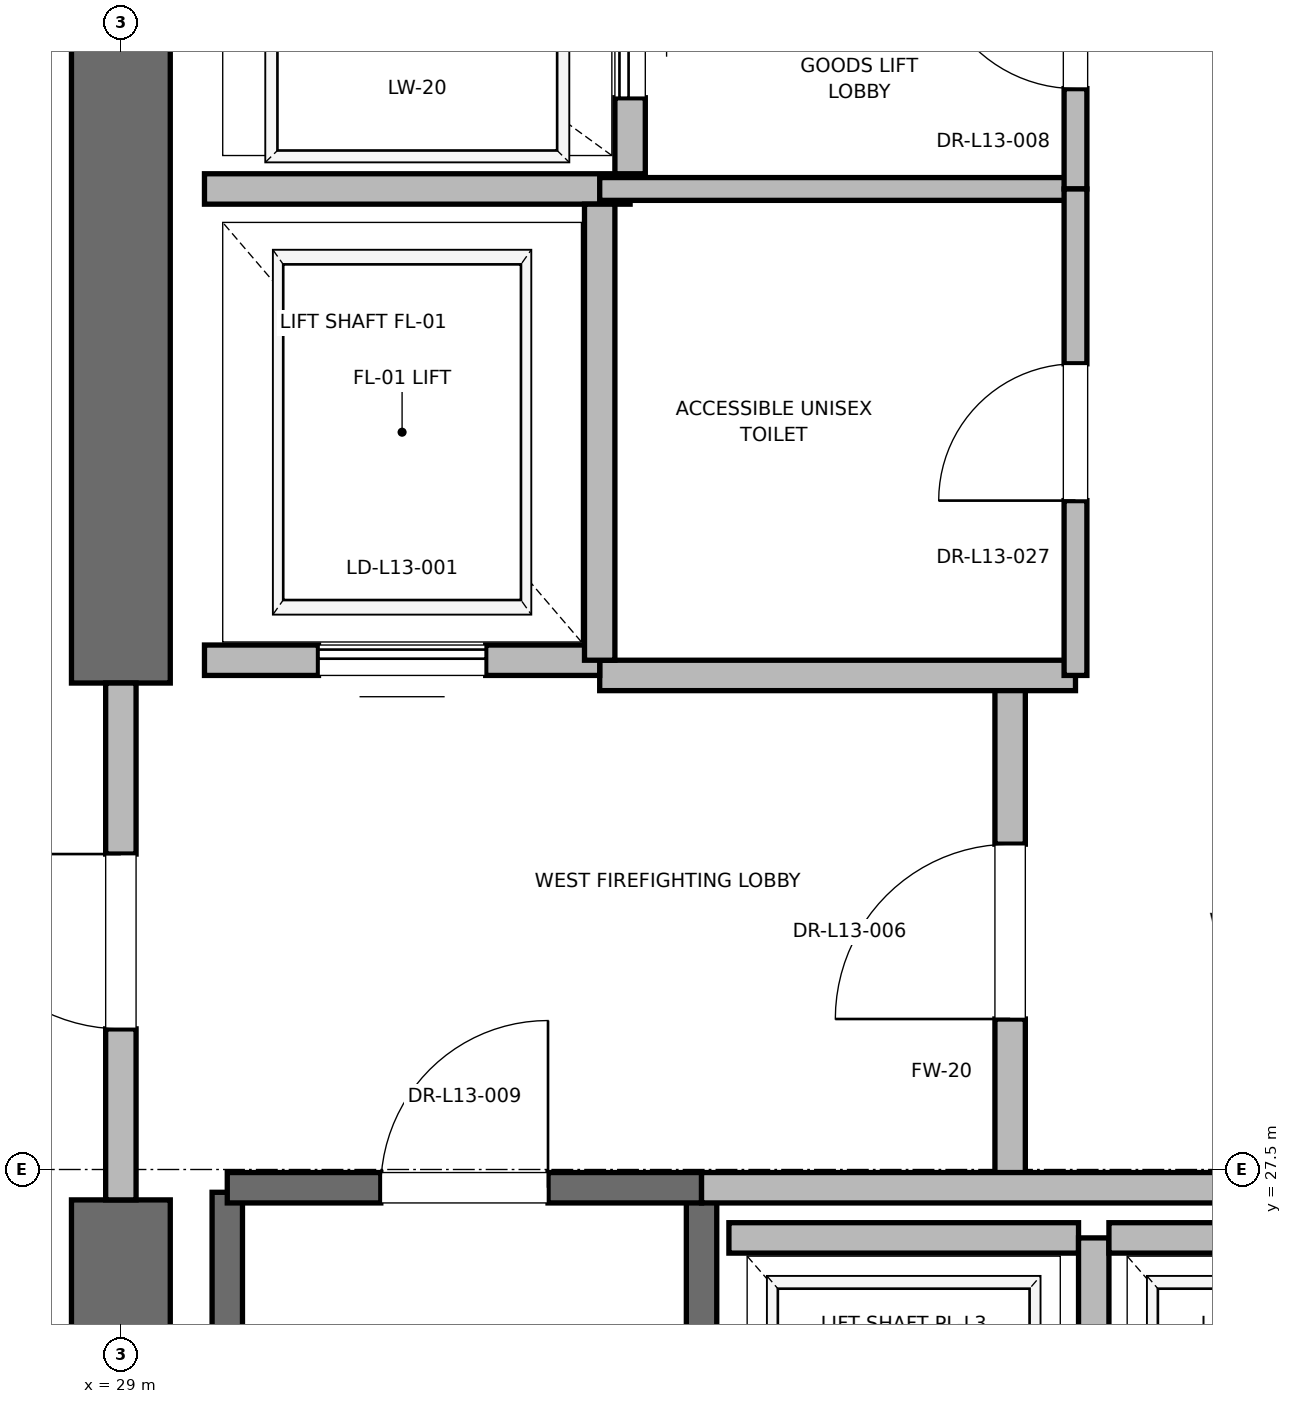
"""IFC4 building model, lengths in metres.
Left out: names, types, materials, properties, quantities, classifications, styles, units other than length and angle.
Written with IfcOpenShell. Run it as: python <this file> out.ifc"""

import sys

from ifc_helpers import new_model, si_unit, direction, frame, frame_2d, origin, place, context, subcontext, project, spatial, rectangle, extrude, element, fill, save


model = new_model("IFC4")
c1 = context("Model", 3, precision=1e-05, world=origin(), true_north=direction((0.0, 1.0)))
c2 = subcontext(c1, "Body", "Model", "MODEL_VIEW")
j1 = project(units=[si_unit("LENGTHUNIT", "METRE"), si_unit("PLANEANGLEUNIT", "RADIAN")], contexts=[c1])
p1 = place(None, origin())
s1 = spatial("IfcSite", under=j1, at=p1, CompositionType="ELEMENT")
p2 = place(p1, origin())
s2 = spatial("IfcBuilding", under=s1, at=p2, CompositionType="ELEMENT")
p3 = place(p2, frame((0.0, 0.0, 59.6)))
s3 = spatial("IfcBuildingStorey", under=s2, at=p3, CompositionType="ELEMENT", Elevation=59.6)
p4 = place(p3, frame((29.0, 18.5, 0.0), z_axis=(0.0, 0.0, 1.0), x_axis=(0.0, 1.0, 0.0)))
e1 = element("IfcWall", 1, at=p4, inside=s3, PredefinedType="SHEAR", context=c2, shape_type="SweptSolid", body=[
    extrude(rectangle(XDim=8.8, YDim=0.65, at=frame_2d((4.4, 0.0))), origin(), (0.0, 0.0, 1.0), 3.76),
])
p5 = place(p3, frame((29.0, 30.7, 0.0), z_axis=(0.0, 0.0, 1.0), x_axis=(0.0, 1.0, 0.0)))
e2 = element("IfcWall", 2, at=p5, inside=s3, PredefinedType="SHEAR", context=c2, shape_type="SweptSolid", body=[
    extrude(rectangle(XDim=5.8, YDim=0.65, at=frame_2d((2.9, 0.0))), origin(), (0.0, 0.0, 1.0), 3.76),
])
p6 = place(p3, frame((29.7, 19.2, 0.0), z_axis=(0.0, 0.0, 1.0), x_axis=(0.0, 1.0, 0.0)))
e3 = element("IfcWall", 3, at=p6, inside=s3, PredefinedType="SOLIDWALL", context=c2, shape_type="SweptSolid", body=[
    extrude(rectangle(XDim=8.15, YDim=0.2, at=frame_2d((4.075, 0.0))), origin(), (0.0, 0.0, 1.0), 3.76),
])
p7 = place(p3, frame((32.82, 18.6, 0.0), z_axis=(0.0, 0.0, 1.0), x_axis=(0.0, 1.0, 0.0)))
e4 = element("IfcWall", 4, at=p7, inside=s3, PredefinedType="SOLIDWALL", context=c2, shape_type="SweptSolid", body=[
    extrude(rectangle(XDim=8.78, YDim=0.2, at=frame_2d((4.39, 0.0))), origin(), (0.0, 0.0, 1.0), 3.76),
])
p8 = place(p3, frame((29.7, 27.38, 0.0), z_axis=(0.0, 0.0, 1.0), x_axis=(1.0, 0.0, 0.0)))
e5 = element("IfcWall", 5, at=p8, inside=s3, PredefinedType="SOLIDWALL", context=c2, shape_type="SweptSolid", body=[
    extrude(rectangle(XDim=3.12, YDim=0.2, at=frame_2d((1.56, 0.0))), origin(), (0.0, 0.0, 1.0), 3.76),
])
p9 = place(p8, frame((1.01, 0.0, 0.0)))
e6 = element("IfcOpeningElement", 6, at=p9, cuts=e5, PredefinedType="OPENING", context=c2, shape_type="SweptSolid", body=[
    extrude(rectangle(XDim=1.1, YDim=2.15, at=frame_2d((0.55, 1.075))), frame((0.0, 0.1, 0.0), z_axis=(0.0, -1.0, 0.0), x_axis=(1.0, 0.0, 0.0)), (0.0, 0.0, 1.0), 0.2),
])
p10 = place(p3, frame((34.85, 27.38, 0.0), z_axis=(0.0, 0.0, 1.0), x_axis=(0.0, 1.0, 0.0)))
e7 = element("IfcWall", 7, at=p10, inside=s3, PredefinedType="PARTITIONING", context=c2, shape_type="SweptSolid", body=[
    extrude(rectangle(XDim=3.37, YDim=0.2, at=frame_2d((1.685, 0.0))), origin(), (0.0, 0.0, 1.0), 3.76),
])
p11 = place(p10, frame((1.11, 0.0, 0.0)))
e8 = element("IfcOpeningElement", 8, at=p11, cuts=e7, PredefinedType="OPENING", context=c2, shape_type="SweptSolid", body=[
    extrude(rectangle(XDim=1.15, YDim=2.2, at=frame_2d((0.575, 1.1))), frame((0.0, 0.1, 0.0), z_axis=(0.0, -1.0, 0.0), x_axis=(1.0, 0.0, 0.0)), (0.0, 0.0, 1.0), 0.2),
])
p12 = place(p3, frame((29.0, 27.3, 0.0), z_axis=(0.0, 0.0, 1.0), x_axis=(0.0, 1.0, 0.0)))
e9 = element("IfcWall", 9, at=p12, inside=s3, PredefinedType="PARTITIONING", context=c2, shape_type="SweptSolid", body=[
    extrude(rectangle(XDim=3.4, YDim=0.2, at=frame_2d((1.7, 0.0))), origin(), (0.0, 0.0, 1.0), 2.54),
])
p13 = place(p12, frame((1.125, 0.0, 0.0)))
e10 = element("IfcOpeningElement", 10, at=p13, cuts=e9, PredefinedType="OPENING", context=c2, shape_type="SweptSolid", body=[
    extrude(rectangle(XDim=1.15, YDim=2.2, at=frame_2d((0.575, 1.1))), frame((0.0, 0.1, 0.0), z_axis=(0.0, -1.0, 0.0), x_axis=(1.0, 0.0, 0.0)), (0.0, 0.0, 1.0), 0.2),
])
p14 = place(p3, frame((32.82, 27.38, 0.0), z_axis=(0.0, 0.0, 1.0), x_axis=(1.0, 0.0, 0.0)))
e11 = element("IfcWall", 11, at=p14, inside=s3, PredefinedType="PARTITIONING", context=c2, shape_type="SweptSolid", body=[
    extrude(rectangle(XDim=5.62, YDim=0.2, at=frame_2d((2.81, 0.0))), origin(), (0.0, 0.0, 1.0), 3.76),
])
p15 = place(p3, frame((32.15, 30.75, 0.0), z_axis=(0.0, 0.0, 1.0), x_axis=(1.0, 0.0, 0.0)))
e12 = element("IfcWall", 12, at=p15, inside=s3, PredefinedType="PARTITIONING", context=c2, shape_type="SweptSolid", body=[
    extrude(rectangle(XDim=3.13, YDim=0.2, at=frame_2d((1.565, 0.0))), origin(), (0.0, 0.0, 1.0), 3.76),
])
p16 = place(p3, frame((29.55, 30.85, 0.0), z_axis=(0.0, 0.0, 1.0), x_axis=(1.0, 0.0, 0.0)))
e13 = element("IfcWall", 13, at=p16, inside=s3, PredefinedType="SOLIDWALL", context=c2, shape_type="SweptSolid", body=[
    extrude(rectangle(XDim=2.6, YDim=0.2, at=frame_2d((1.3, 0.0))), origin(), (0.0, 0.0, 1.0), 2.54),
])
p17 = place(p16, frame((0.75, 0.0, 0.0)))
e14 = element("IfcOpeningElement", 14, at=p17, cuts=e13, PredefinedType="OPENING", context=c2, shape_type="SweptSolid", body=[
    extrude(rectangle(XDim=1.1, YDim=2.2, at=frame_2d((0.55, 1.1))), frame((0.0, 0.1, 0.0), z_axis=(0.0, -1.0, 0.0), x_axis=(1.0, 0.0, 0.0)), (0.0, 0.0, 1.0), 0.2),
])
p18 = place(p3, frame((29.55, 33.95, 0.0), z_axis=(0.0, 0.0, 1.0), x_axis=(1.0, 0.0, 0.0)))
e15 = element("IfcWall", 15, at=p18, inside=s3, PredefinedType="SOLIDWALL", context=c2, shape_type="SweptSolid", body=[
    extrude(rectangle(XDim=2.8, YDim=0.2, at=frame_2d((1.4, 0.0))), origin(), (0.0, 0.0, 1.0), 3.76),
])
p19 = place(p3, frame((32.15, 30.85, 0.0), z_axis=(0.0, 0.0, 1.0), x_axis=(0.0, 1.0, 0.0)))
e16 = element("IfcWall", 16, at=p19, inside=s3, PredefinedType="SOLIDWALL", context=c2, shape_type="SweptSolid", body=[
    extrude(rectangle(XDim=3.0, YDim=0.2, at=frame_2d((1.5, 0.0))), origin(), (0.0, 0.0, 1.0), 3.76),
])
p20 = place(p3, frame((32.35, 34.05, 0.0), z_axis=(0.0, 0.0, 1.0), x_axis=(0.0, 1.0, 0.0)))
e17 = element("IfcWall", 17, at=p20, inside=s3, PredefinedType="SOLIDWALL", context=c2, shape_type="SweptSolid", body=[
    extrude(rectangle(XDim=2.1, YDim=0.2, at=frame_2d((1.05, 0.0))), origin(), (0.0, 0.0, 1.0), 3.76),
])
p21 = place(p20, frame((0.5, 0.0, 0.0)))
e18 = element("IfcOpeningElement", 18, at=p21, cuts=e17, PredefinedType="OPENING", context=c2, shape_type="SweptSolid", body=[
    extrude(rectangle(XDim=1.1, YDim=2.2, at=frame_2d((0.55, 1.1))), frame((0.0, 0.1, 0.0), z_axis=(0.0, -1.0, 0.0), x_axis=(1.0, 0.0, 0.0)), (0.0, 0.0, 1.0), 0.2),
])
p22 = place(p3, frame((35.3, 27.05, 0.0), z_axis=(0.0, 0.0, 1.0), x_axis=(-1.0, 0.0, 0.0)))
e19 = element("IfcWall", 19, at=p22, inside=s3, PredefinedType="SOLIDWALL", context=c2, shape_type="SweptSolid", body=[
    extrude(rectangle(XDim=2.3, YDim=0.2, at=frame_2d((1.15, 0.0))), origin(), (0.0, 0.0, 1.0), 3.76),
])
p23 = place(p3, frame((35.4, 24.45, 0.0), z_axis=(0.0, 0.0, 1.0), x_axis=(0.0, 1.0, 0.0)))
e20 = element("IfcWall", 20, at=p23, inside=s3, PredefinedType="SOLIDWALL", context=c2, shape_type="SweptSolid", body=[
    extrude(rectangle(XDim=2.6, YDim=0.2, at=frame_2d((1.3, 0.0))), origin(), (0.0, 0.0, 1.0), 3.76),
])
p24 = place(p3, frame((37.8, 27.05, 0.0), z_axis=(0.0, 0.0, 1.0), x_axis=(-1.0, 0.0, 0.0)))
e21 = element("IfcWall", 21, at=p24, inside=s3, PredefinedType="SOLIDWALL", context=c2, shape_type="SweptSolid", body=[
    extrude(rectangle(XDim=2.3, YDim=0.2, at=frame_2d((1.15, 0.0))), origin(), (0.0, 0.0, 1.0), 3.76),
])
p25 = place(p3, frame((32.15, 33.95, 0.0), z_axis=(0.0, 0.0, 1.0), x_axis=(1.0, 0.0, 0.0)))
e22 = element("IfcWall", 22, at=p25, inside=s3, PredefinedType="PARTITIONING", context=c2, shape_type="SweptSolid", body=[
    extrude(rectangle(XDim=3.13, YDim=0.15, at=frame_2d((1.565, 0.0))), origin(), (0.0, 0.0, 1.0), 2.85),
])
p26 = place(p3, frame((35.28, 33.95, 0.0), z_axis=(0.0, 0.0, 1.0), x_axis=(0.0, 1.0, 0.0)))
e23 = element("IfcWall", 23, at=p26, inside=s3, PredefinedType="PARTITIONING", context=c2, shape_type="SweptSolid", body=[
    extrude(rectangle(XDim=2.27, YDim=0.15, at=frame_2d((1.135, 0.0))), origin(), (0.0, 0.0, 1.0), 2.54),
])
p27 = place(p26, frame((0.66, 0.0, 0.0)))
e24 = element("IfcOpeningElement", 24, at=p27, cuts=e23, PredefinedType="OPENING", context=c2, shape_type="SweptSolid", body=[
    extrude(rectangle(XDim=0.95, YDim=2.15, at=frame_2d((0.475, 1.075))), frame((0.0, 0.075, 0.0), z_axis=(0.0, -1.0, 0.0), x_axis=(1.0, 0.0, 0.0)), (0.0, 0.0, 1.0), 0.15),
])
p28 = place(p3, frame((35.28, 30.75, 0.0), z_axis=(0.0, 0.0, 1.0), x_axis=(0.0, 1.0, 0.0)))
e25 = element("IfcWall", 25, at=p28, inside=s3, PredefinedType="PARTITIONING", context=c2, shape_type="SweptSolid", body=[
    extrude(rectangle(XDim=3.2, YDim=0.15, at=frame_2d((1.6, 0.0))), origin(), (0.0, 0.0, 1.0), 2.85),
])
p29 = place(p28, frame((1.15, 0.0, 0.0)))
e26 = element("IfcOpeningElement", 26, at=p29, cuts=e25, PredefinedType="OPENING", context=c2, shape_type="SweptSolid", body=[
    extrude(rectangle(XDim=0.9, YDim=2.1, at=frame_2d((0.45, 1.05))), frame((0.0, 0.075, 0.0), z_axis=(0.0, -1.0, 0.0), x_axis=(1.0, 0.0, 0.0)), (0.0, 0.0, 1.0), 0.15),
])
p30 = place(p9, origin())
e27 = element("IfcDoor", 27, at=p30, inside=s3, OperationType="SINGLE_SWING_RIGHT", PredefinedType="DOOR", context=c2, shape_type="SweptSolid", body=[
    extrude(rectangle(XDim=1.1, YDim=2.15, at=frame_2d((0.55, 1.075))), frame((0.0, 0.025, 0.0), z_axis=(0.0, -1.0, 0.0), x_axis=(1.0, 0.0, 0.0)), (0.0, 0.0, 1.0), 0.05),
])
fill(e6, e27)
p31 = place(p11, origin())
e28 = element("IfcDoor", 28, at=p31, inside=s3, OperationType="SINGLE_SWING_LEFT", PredefinedType="DOOR", context=c2, shape_type="SweptSolid", body=[
    extrude(rectangle(XDim=1.15, YDim=2.2, at=frame_2d((0.575, 1.1))), frame((0.0, 0.025, 0.0), z_axis=(0.0, -1.0, 0.0), x_axis=(1.0, 0.0, 0.0)), (0.0, 0.0, 1.0), 0.05),
])
fill(e8, e28)
p32 = place(p13, origin())
e29 = element("IfcDoor", 29, at=p32, inside=s3, OperationType="SINGLE_SWING_RIGHT", PredefinedType="DOOR", context=c2, shape_type="SweptSolid", body=[
    extrude(rectangle(XDim=1.15, YDim=2.2, at=frame_2d((0.575, 1.1))), frame((0.0, 0.025, 0.0), z_axis=(0.0, -1.0, 0.0), x_axis=(1.0, 0.0, 0.0)), (0.0, 0.0, 1.0), 0.05),
])
fill(e10, e29)
p33 = place(p17, origin())
e30 = element("IfcDoor", 30, at=p33, inside=s3, OperationType="SLIDING_TO_RIGHT", PredefinedType="DOOR", context=c2, shape_type="SweptSolid", body=[
    extrude(rectangle(XDim=1.1, YDim=2.2, at=frame_2d((0.55, 1.1))), frame((0.0, 0.025, 0.0), z_axis=(0.0, -1.0, 0.0), x_axis=(1.0, 0.0, 0.0)), (0.0, 0.0, 1.0), 0.05),
])
fill(e14, e30)
p34 = place(p21, origin())
e31 = element("IfcDoor", 31, at=p34, inside=s3, OperationType="SLIDING_TO_RIGHT", PredefinedType="DOOR", context=c2, shape_type="SweptSolid", body=[
    extrude(rectangle(XDim=1.1, YDim=2.2, at=frame_2d((0.55, 1.1))), frame((0.0, 0.025, 0.0), z_axis=(0.0, -1.0, 0.0), x_axis=(1.0, 0.0, 0.0)), (0.0, 0.0, 1.0), 0.05),
])
fill(e18, e31)
p35 = place(p27, origin())
e32 = element("IfcDoor", 32, at=p35, inside=s3, OperationType="SINGLE_SWING_RIGHT", PredefinedType="DOOR", context=c2, shape_type="SweptSolid", body=[
    extrude(rectangle(XDim=0.95, YDim=2.15, at=frame_2d((0.475, 1.075))), frame((0.0, 0.025, 0.0), z_axis=(0.0, -1.0, 0.0), x_axis=(1.0, 0.0, 0.0)), (0.0, 0.0, 1.0), 0.05),
])
fill(e24, e32)
p36 = place(p29, origin())
e33 = element("IfcDoor", 33, at=p36, inside=s3, OperationType="SINGLE_SWING_LEFT", PredefinedType="DOOR", context=c2, shape_type="SweptSolid", body=[
    extrude(rectangle(XDim=0.9, YDim=2.1, at=frame_2d((0.45, 1.05))), frame((0.0, 0.025, 0.0), z_axis=(0.0, -1.0, 0.0), x_axis=(1.0, 0.0, 0.0)), (0.0, 0.0, 1.0), 0.05),
])
fill(e26, e33)
save(model, sys.argv[1])
